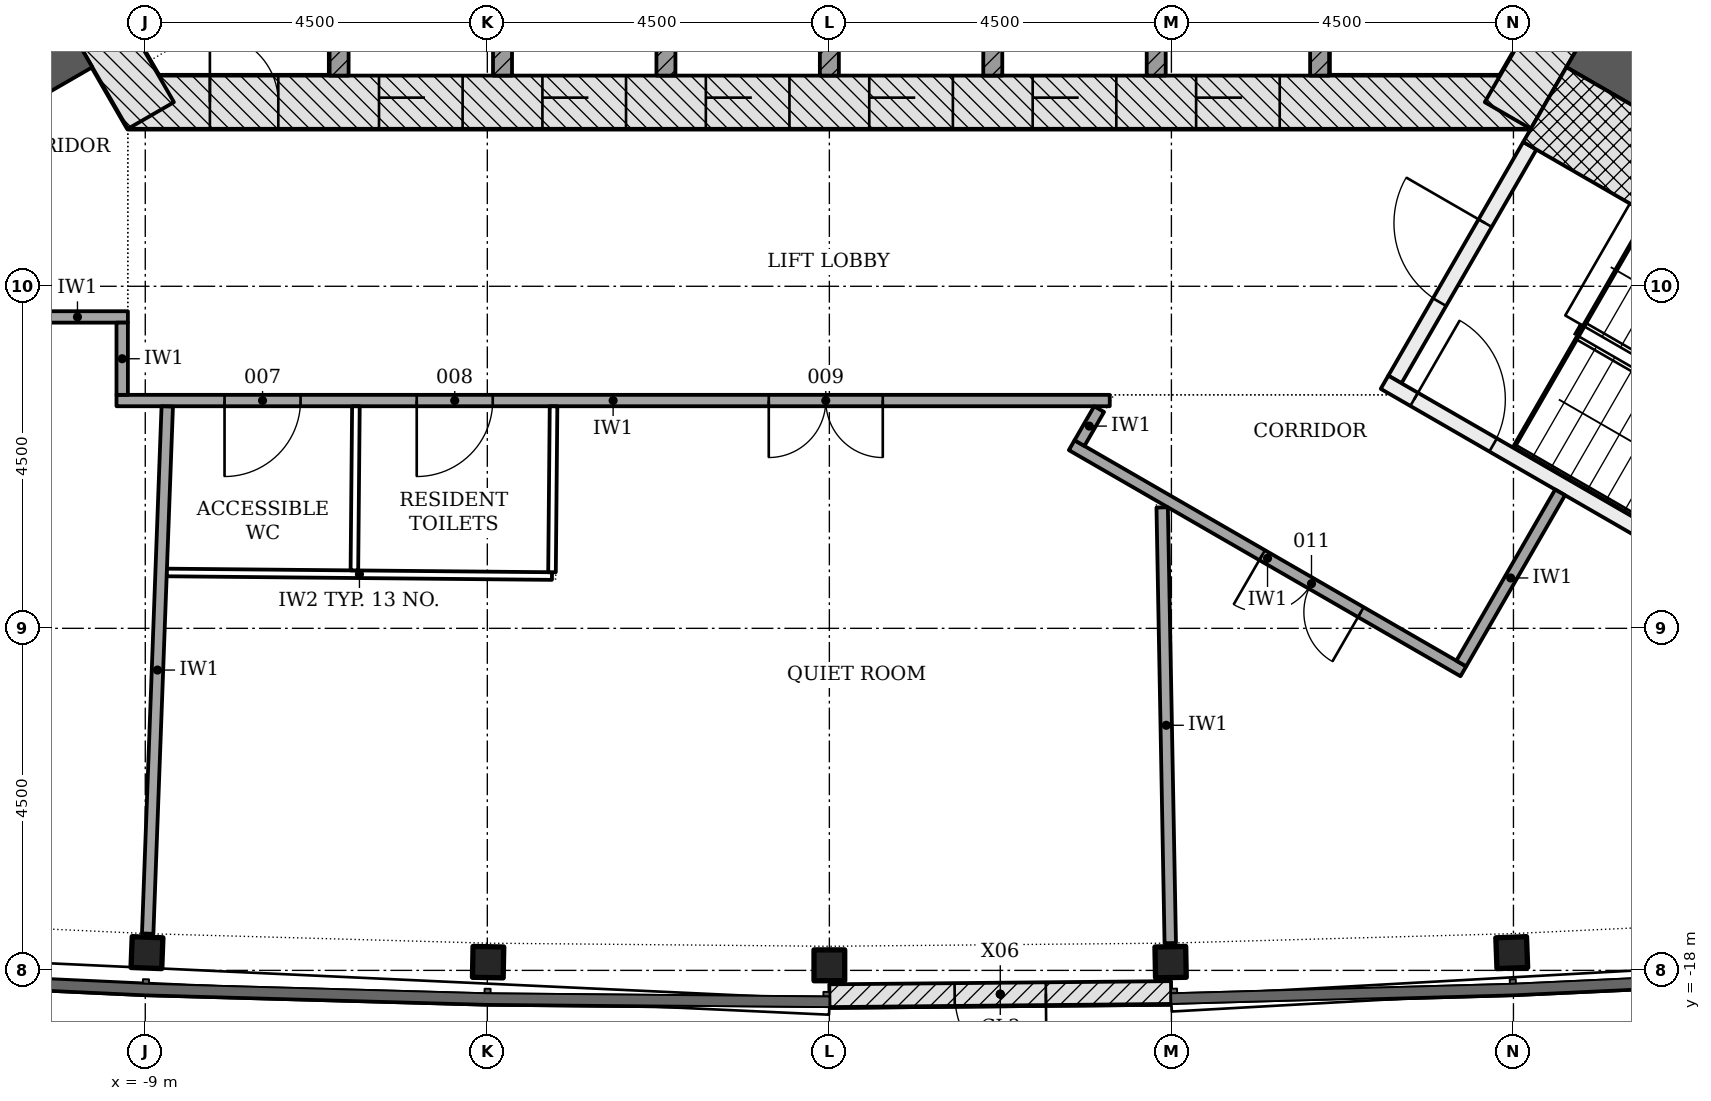
"""IFC4 building model, lengths in metres.
Left out: names, types, materials, properties, quantities, classifications, styles, units other than length and angle.
Written with IfcOpenShell. Run it as: python <this file> out.ifc"""

import sys

from ifc_helpers import new_model, si_unit, direction, frame, frame_2d, origin, origin_2d, place, context, subcontext, project, spatial, rectangle, i_section, extrude, element, fill, save


model = new_model("IFC4")
c1 = context("Model", 3, precision=1e-05, world=origin(), true_north=direction((0.0, 1.0)))
c2 = subcontext(c1, "Body", "Model", "MODEL_VIEW")
j1 = project(units=[si_unit("LENGTHUNIT", "METRE"), si_unit("PLANEANGLEUNIT", "RADIAN")], contexts=[c1])
p1 = place(None, origin())
s1 = spatial("IfcSite", under=j1, at=p1, CompositionType="ELEMENT")
p2 = place(p1, origin())
s2 = spatial("IfcBuilding", under=s1, at=p2, CompositionType="ELEMENT")
p3 = place(p2, frame((0.0, 0.0, 24.0)))
s3 = spatial("IfcBuildingStorey", under=s2, at=p3, CompositionType="ELEMENT", Elevation=24.0)
p4 = place(p3, frame((-9.229, -6.578, -0.2), z_axis=(0.0, 0.0, 1.0), x_axis=(1.0, 0.0, 0.0)))
e1 = element("IfcWall", 1, at=p4, inside=s3, PredefinedType="SHEAR", context=c2, shape_type="SweptSolid", body=[
    extrude(rectangle(XDim=18.458, YDim=0.7, at=frame_2d((9.229, 0.0))), origin(), (0.0, 0.0, 1.0), 3.6),
])
p5 = place(p4, frame((3.304, 0.0, 0.2)))
e2 = element("IfcOpeningElement", 2, at=p5, cuts=e1, PredefinedType="OPENING", context=c2, shape_type="SweptSolid", body=[
    extrude(rectangle(XDim=1.1, YDim=2.1, at=frame_2d((0.55, 1.05))), frame((0.0, 0.36, 0.0), z_axis=(0.0, -1.0, 0.0), x_axis=(1.0, 0.0, 0.0)), (0.0, 0.0, 1.0), 0.72),
])
p6 = place(p4, frame((5.454, 0.0, 0.2)))
e3 = element("IfcOpeningElement", 3, at=p6, cuts=e1, PredefinedType="OPENING", context=c2, shape_type="SweptSolid", body=[
    extrude(rectangle(XDim=1.1, YDim=2.1, at=frame_2d((0.55, 1.05))), frame((0.0, 0.36, 0.0), z_axis=(0.0, -1.0, 0.0), x_axis=(1.0, 0.0, 0.0)), (0.0, 0.0, 1.0), 0.72),
])
p7 = place(p4, frame((7.604, 0.0, 0.2)))
e4 = element("IfcOpeningElement", 4, at=p7, cuts=e1, PredefinedType="OPENING", context=c2, shape_type="SweptSolid", body=[
    extrude(rectangle(XDim=1.1, YDim=2.1, at=frame_2d((0.55, 1.05))), frame((0.0, 0.36, 0.0), z_axis=(0.0, -1.0, 0.0), x_axis=(1.0, 0.0, 0.0)), (0.0, 0.0, 1.0), 0.72),
])
p8 = place(p4, frame((9.754, 0.0, 0.2)))
e5 = element("IfcOpeningElement", 5, at=p8, cuts=e1, PredefinedType="OPENING", context=c2, shape_type="SweptSolid", body=[
    extrude(rectangle(XDim=1.1, YDim=2.1, at=frame_2d((0.55, 1.05))), frame((0.0, 0.36, 0.0), z_axis=(0.0, -1.0, 0.0), x_axis=(1.0, 0.0, 0.0)), (0.0, 0.0, 1.0), 0.72),
])
p9 = place(p4, frame((11.904, 0.0, 0.2)))
e6 = element("IfcOpeningElement", 6, at=p9, cuts=e1, PredefinedType="OPENING", context=c2, shape_type="SweptSolid", body=[
    extrude(rectangle(XDim=1.1, YDim=2.1, at=frame_2d((0.55, 1.05))), frame((0.0, 0.36, 0.0), z_axis=(0.0, -1.0, 0.0), x_axis=(1.0, 0.0, 0.0)), (0.0, 0.0, 1.0), 0.72),
])
p10 = place(p4, frame((14.054, 0.0, 0.2)))
e7 = element("IfcOpeningElement", 7, at=p10, cuts=e1, PredefinedType="OPENING", context=c2, shape_type="SweptSolid", body=[
    extrude(rectangle(XDim=1.1, YDim=2.1, at=frame_2d((0.55, 1.05))), frame((0.0, 0.36, 0.0), z_axis=(0.0, -1.0, 0.0), x_axis=(1.0, 0.0, 0.0)), (0.0, 0.0, 1.0), 0.72),
])
p11 = place(p4, frame((1.079, 0.0, 0.2)))
e8 = element("IfcOpeningElement", 8, at=p11, cuts=e1, PredefinedType="OPENING", context=c2, shape_type="SweptSolid", body=[
    extrude(rectangle(XDim=0.9, YDim=2.1, at=frame_2d((0.45, 1.05))), frame((0.0, 0.36, 0.0), z_axis=(0.0, -1.0, 0.0), x_axis=(1.0, 0.0, 0.0)), (0.0, 0.0, 1.0), 0.72),
])
for number, where, z_axis, x_axis in (
    (9, (8.926, -6.753, -0.2), (0.0, 0.0, 1.0), (0.5, 0.866, 0.0)),
    (10, (-10.311, -4.353, -0.2), (0.0, 0.0, 1.0), (0.5, -0.866, 0.0)),
):
    element("IfcWall", number, at=place(p3, frame(where, z_axis=z_axis, x_axis=x_axis)), inside=s3, PredefinedType="SHEAR", context=c2, shape_type="SweptSolid", body=[
        extrude(rectangle(XDim=2.771, YDim=0.7, at=frame_2d((1.386, 0.0))), origin(), (0.0, 0.0, 1.0), 3.6),
    ])
for number, where, z_axis, x_axis in (
    (11, (-9.922, -5.728, -0.2), (0.0, 0.0, 1.0), (-0.866, -0.5, 0.0)),
    (12, (9.922, -5.728, -0.2), (0.0, 0.0, 1.0), (0.866, -0.5, 0.0)),
):
    element("IfcWall", number, at=place(p3, frame(where, z_axis=z_axis, x_axis=x_axis)), inside=s3, PredefinedType="SHEAR", context=c2, shape_type="SweptSolid", body=[
        extrude(rectangle(XDim=14.633, YDim=0.9, at=frame_2d((7.316, 0.0))), origin(), (0.0, 0.0, 1.0), 3.6),
    ])
for number, where, z_axis, x_axis in (
    (13, (-8.978, -17.767, -0.2), (0.0, 0.0, 1.0), (0.999, -0.037, 0.0)),
    (14, (-4.49, -17.892, -0.2), (0.0, 0.0, 1.0), (1.0, -0.019, 0.0)),
    (15, (0.0, -17.933, -0.2), (0.0, 0.0, 1.0), (1.0, 0.0, 0.0)),
    (16, (4.49, -17.892, -0.2), (0.0, 0.0, 1.0), (1.0, 0.019, 0.0)),
    (17, (8.978, -17.767, -0.2), (0.0, 0.0, 1.0), (0.999, 0.037, 0.0)),
):
    element("IfcColumn", number, at=place(p3, frame(where, z_axis=z_axis, x_axis=x_axis)), inside=s3, PredefinedType="COLUMN", context=c2, shape_type="SweptSolid", body=[
        extrude(i_section(OverallWidth=0.404, OverallDepth=0.406, WebThickness=0.027, FlangeThickness=0.044, FilletRadius=0.015, at=origin_2d()), origin(), (0.0, 0.0, 1.0), 3.6),
    ])
p12 = place(p3, frame((4.496, -18.292, 0.0), z_axis=(0.0, 0.0, 1.0), x_axis=(-0.999956888742, -0.0092855079, 0.0)))
e18 = element("IfcWall", 18, at=p12, inside=s3, PredefinedType="NOTDEFINED", context=c2, shape_type="SweptSolid", body=[
    extrude(rectangle(XDim=4.496, YDim=0.3, at=frame_2d((2.248, 0.0))), origin(), (0.0, 0.0, 1.0), 3.3),
])
p13 = place(p12, frame((1.648, 0.0, 0.0)))
e19 = element("IfcOpeningElement", 19, at=p13, cuts=e18, PredefinedType="OPENING", context=c2, shape_type="SweptSolid", body=[
    extrude(rectangle(XDim=1.2, YDim=2.4, at=frame_2d((0.6, 1.2))), frame((0.0, 0.16, 0.0), z_axis=(0.0, -1.0, 0.0), x_axis=(1.0, 0.0, 0.0)), (0.0, 0.0, 1.0), 0.32),
])
for number, where, z_axis, x_axis in (
    (20, (-6.45, -6.228, -0.2), (0.0, 0.0, 1.0), (0.0, 1.0, 0.0)),
    (21, (-4.3, -6.228, -0.2), (0.0, 0.0, 1.0), (0.0, 1.0, 0.0)),
    (22, (-2.15, -6.228, -0.2), (0.0, 0.0, 1.0), (0.0, 1.0, 0.0)),
    (23, (0.0, -6.228, -0.2), (0.0, 0.0, 1.0), (0.0, 1.0, 0.0)),
    (24, (2.15, -6.228, -0.2), (0.0, 0.0, 1.0), (0.0, 1.0, 0.0)),
    (25, (4.3, -6.228, -0.2), (0.0, 0.0, 1.0), (0.0, 1.0, 0.0)),
    (26, (6.45, -6.228, -0.2), (0.0, 0.0, 1.0), (0.0, 1.0, 0.0)),
):
    element("IfcWall", number, at=place(p3, frame(where, z_axis=z_axis, x_axis=x_axis)), inside=s3, PredefinedType="PARTITIONING", context=c2, shape_type="SweptSolid", body=[
        extrude(rectangle(XDim=2.5, YDim=0.25, at=frame_2d((1.25, 0.0))), origin(), (0.0, 0.0, 1.0), 3.6),
    ])
p14 = place(p3, frame((-10.43, -4.847, -0.2), z_axis=(0.0, 0.0, 1.0), x_axis=(-0.866018442252, -0.500012057535, 0.0)))
e27 = element("IfcWall", 27, at=p14, inside=s3, PredefinedType="SHEAR", context=c2, shape_type="SweptSolid", body=[
    extrude(rectangle(XDim=7.2, YDim=1.136, at=frame_2d((3.6, 0.0))), origin(), (0.0, 0.0, 1.0), 3.6),
])
p15 = place(p3, frame((7.44, -10.226, -0.2), z_axis=(0.0, 0.0, 1.0), x_axis=(0.500022077904, 0.866012656725, 0.0)))
e28 = element("IfcWall", 28, at=p15, inside=s3, PredefinedType="SHEAR", context=c2, shape_type="SweptSolid", body=[
    extrude(rectangle(XDim=3.55, YDim=0.2, at=frame_2d((1.775, 0.0))), origin(), (0.0, 0.0, 1.0), 3.6),
])
p16 = place(p15, frame((1.175, 0.0, 0.2)))
e29 = element("IfcOpeningElement", 29, at=p16, cuts=e28, PredefinedType="OPENING", context=c2, shape_type="SweptSolid", body=[
    extrude(rectangle(XDim=1.2, YDim=2.1, at=frame_2d((0.6, 1.05))), frame((0.0, 0.11, 0.0), z_axis=(0.0, -1.0, 0.0), x_axis=(1.0, 0.0, 0.0)), (0.0, 0.0, 1.0), 0.22),
])
p17 = place(p3, frame((7.304, -10.262, -0.2), z_axis=(0.0, 0.0, 1.0), x_axis=(0.866026594901, -0.49999793692, 0.0)))
e30 = element("IfcWall", 30, at=p17, inside=s3, PredefinedType="SHEAR", context=c2, shape_type="SweptSolid", body=[
    extrude(rectangle(XDim=5.6, YDim=0.2, at=frame_2d((2.8, 0.0))), origin(), (0.0, 0.0, 1.0), 3.6),
])
p18 = place(p17, frame((0.45, 0.0, 0.2)))
e31 = element("IfcOpeningElement", 31, at=p18, cuts=e30, PredefinedType="OPENING", context=c2, shape_type="SweptSolid", body=[
    extrude(rectangle(XDim=1.2, YDim=2.1, at=frame_2d((0.6, 1.05))), frame((0.0, 0.11, 0.0), z_axis=(0.0, -1.0, 0.0), x_axis=(1.0, 0.0, 0.0)), (0.0, 0.0, 1.0), 0.22),
])
p19 = place(p3, frame((9.413, -6.61, -0.2), z_axis=(0.0, 0.0, 1.0), x_axis=(0.866018442252, -0.500012057535, 0.0)))
e32 = element("IfcWall", 32, at=p19, inside=s3, PredefinedType="SHEAR", context=c2, shape_type="SweptSolid", body=[
    extrude(rectangle(XDim=7.2, YDim=1.136, at=frame_2d((3.6, 0.0))), origin(), (0.0, 0.0, 1.0), 3.6),
])
p20 = place(p3, frame((3.689, -10.503, 0.0), z_axis=(0.0, 0.0, 1.0), x_axis=(-1.0, 0.0, 0.0)))
e33 = element("IfcWall", 33, at=p20, inside=s3, PredefinedType="PARTITIONING", context=c2, shape_type="SweptSolid", body=[
    extrude(rectangle(XDim=13.068, YDim=0.15, at=frame_2d((6.534, 0.0))), origin(), (0.0, 0.0, 1.0), 2.768),
])
p21 = place(p20, frame((10.646, 0.0, 0.0)))
e34 = element("IfcOpeningElement", 34, at=p21, cuts=e33, PredefinedType="OPENING", context=c2, shape_type="SweptSolid", body=[
    extrude(rectangle(XDim=1.0, YDim=2.1, at=frame_2d((0.5, 1.05))), frame((0.0, 0.085, 0.0), z_axis=(0.0, -1.0, 0.0), x_axis=(1.0, 0.0, 0.0)), (0.0, 0.0, 1.0), 0.17),
])
p22 = place(p20, frame((8.118, 0.0, 0.0)))
e35 = element("IfcOpeningElement", 35, at=p22, cuts=e33, PredefinedType="OPENING", context=c2, shape_type="SweptSolid", body=[
    extrude(rectangle(XDim=1.0, YDim=2.1, at=frame_2d((0.5, 1.05))), frame((0.0, 0.085, 0.0), z_axis=(0.0, -1.0, 0.0), x_axis=(1.0, 0.0, 0.0)), (0.0, 0.0, 1.0), 0.17),
])
p23 = place(p20, frame((2.986, 0.0, 0.0)))
e36 = element("IfcOpeningElement", 36, at=p23, cuts=e33, PredefinedType="OPENING", context=c2, shape_type="SweptSolid", body=[
    extrude(rectangle(XDim=1.5, YDim=2.1, at=frame_2d((0.75, 1.05))), frame((0.0, 0.085, 0.0), z_axis=(0.0, -1.0, 0.0), x_axis=(1.0, 0.0, 0.0)), (0.0, 0.0, 1.0), 0.17),
])
p24 = place(p3, frame((8.341, -14.066, 0.0), z_axis=(0.0, 0.0, 1.0), x_axis=(-0.866017493347, 0.500013701029, 0.0)))
e37 = element("IfcWall", 37, at=p24, inside=s3, PredefinedType="PARTITIONING", context=c2, shape_type="SweptSolid", body=[
    extrude(rectangle(XDim=5.95, YDim=0.15, at=frame_2d((2.975, 0.0))), origin(), (0.0, 0.0, 1.0), 2.768),
])
p25 = place(p24, frame((1.557, 0.0, 0.0)))
e38 = element("IfcOpeningElement", 38, at=p25, cuts=e37, PredefinedType="OPENING", context=c2, shape_type="SweptSolid", body=[
    extrude(rectangle(XDim=1.5, YDim=2.1, at=frame_2d((0.75, 1.05))), frame((0.0, 0.085, 0.0), z_axis=(0.0, -1.0, 0.0), x_axis=(1.0, 0.0, 0.0)), (0.0, 0.0, 1.0), 0.17),
])
p26 = place(p3, frame((8.314, -13.963, 0.0), z_axis=(0.0, 0.0, 1.0), x_axis=(0.499936506574, 0.866062058628, 0.0)))
e39 = element("IfcWall", 39, at=p26, inside=s3, PredefinedType="PARTITIONING", context=c2, shape_type="SweptSolid", body=[
    extrude(rectangle(XDim=2.6, YDim=0.15, at=frame_2d((1.3, 0.0))), origin(), (0.0, 0.0, 1.0), 2.923),
])
p27 = place(p3, frame((-10.555, -9.403, 0.0), z_axis=(0.0, 0.0, 1.0), x_axis=(1.0, 0.0, 0.0)))
e40 = element("IfcWall", 40, at=p27, inside=s3, PredefinedType="PARTITIONING", context=c2, shape_type="SweptSolid", body=[
    extrude(rectangle(XDim=1.326, YDim=0.15, at=frame_2d((0.663, 0.0))), origin(), (0.0, 0.0, 1.0), 3.4),
])
p28 = place(p3, frame((-9.304, -10.428, 0.0), z_axis=(0.0, 0.0, 1.0), x_axis=(0.0, 1.0, 0.0)))
e41 = element("IfcWall", 41, at=p28, inside=s3, PredefinedType="PARTITIONING", context=c2, shape_type="SweptSolid", body=[
    extrude(rectangle(XDim=0.95, YDim=0.15, at=frame_2d((0.475, 0.0))), origin(), (0.0, 0.0, 1.0), 3.4),
])
p29 = place(p3, frame((3.291, -11.063, 0.0), z_axis=(0.0, 0.0, 1.0), x_axis=(0.499899694197, 0.866083307622, 0.0)))
e42 = element("IfcWall", 42, at=p29, inside=s3, PredefinedType="PARTITIONING", context=c2, shape_type="SweptSolid", body=[
    extrude(rectangle(XDim=0.517, YDim=0.15, at=frame_2d((0.258, 0.0))), origin(), (0.0, 0.0, 1.0), 3.4),
])
p30 = place(p3, frame((-8.968, -17.517, 0.0), z_axis=(0.0, 0.0, 1.0), x_axis=(0.037111842783, 0.999311118284, 0.0)))
e43 = element("IfcWall", 43, at=p30, inside=s3, PredefinedType="PARTITIONING", context=c2, shape_type="SweptSolid", body=[
    extrude(rectangle(XDim=6.94, YDim=0.15, at=frame_2d((3.47, 0.0))), origin(), (0.0, 0.0, 1.0), 2.768),
])
p31 = place(p3, frame((4.485, -17.642, 0.0), z_axis=(0.0, 0.0, 1.0), x_axis=(-0.018565794352, 0.999827640786, 0.0)))
e44 = element("IfcWall", 44, at=p31, inside=s3, PredefinedType="PARTITIONING", context=c2, shape_type="SweptSolid", body=[
    extrude(rectangle(XDim=5.733, YDim=0.15, at=frame_2d((2.867, 0.0))), origin(), (0.0, 0.0, 1.0), 2.768),
])
p32 = place(p3, frame((-8.715, -12.765, 0.0), z_axis=(0.0, 0.0, 1.0), x_axis=(0.999957193633, -0.00925261596, 0.0)))
e45 = element("IfcWall", 45, at=p32, inside=s3, PredefinedType="PARTITIONING", context=c2, shape_type="SweptSolid", body=[
    extrude(rectangle(XDim=5.066, YDim=0.1, at=frame_2d((2.533, 0.0))), origin(), (0.0, 0.0, 1.0), 2.768),
])
p33 = place(p3, frame((-3.649, -12.762, 0.0), z_axis=(0.0, 0.0, 1.0), x_axis=(0.009279564663, 0.999956943913, 0.0)))
e46 = element("IfcWall", 46, at=p33, inside=s3, PredefinedType="PARTITIONING", context=c2, shape_type="SweptSolid", body=[
    extrude(rectangle(XDim=2.184, YDim=0.1, at=frame_2d((1.092, 0.0))), origin(), (0.0, 0.0, 1.0), 3.4),
])
p34 = place(p3, frame((-6.249, -12.738, 0.0), z_axis=(0.0, 0.0, 1.0), x_axis=(0.009270376076, 0.99995702914, 0.0)))
e47 = element("IfcWall", 47, at=p34, inside=s3, PredefinedType="PARTITIONING", context=c2, shape_type="SweptSolid", body=[
    extrude(rectangle(XDim=2.159, YDim=0.1, at=frame_2d((1.08, 0.0))), origin(), (0.0, 0.0, 1.0), 3.4),
])
p35 = place(p13, origin())
e48 = element("IfcDoor", 48, at=p35, inside=s3, OperationType="SINGLE_SWING_LEFT", PredefinedType="DOOR", context=c2, shape_type="SweptSolid", body=[
    extrude(rectangle(XDim=1.2, YDim=2.4, at=frame_2d((0.6, 1.2))), frame((0.0, 0.025, 0.0), z_axis=(0.0, -1.0, 0.0), x_axis=(1.0, 0.0, 0.0)), (0.0, 0.0, 1.0), 0.05),
])
fill(e19, e48)
p36 = place(p5, origin())
e49 = element("IfcDoor", 49, at=p36, inside=s3, OperationType="DOUBLE_DOOR_SLIDING", PredefinedType="DOOR", context=c2, shape_type="SweptSolid", body=[
    extrude(rectangle(XDim=1.1, YDim=2.1, at=frame_2d((0.55, 1.05))), frame((0.0, 0.025, 0.0), z_axis=(0.0, -1.0, 0.0), x_axis=(1.0, 0.0, 0.0)), (0.0, 0.0, 1.0), 0.05),
])
fill(e2, e49)
p37 = place(p6, origin())
e50 = element("IfcDoor", 50, at=p37, inside=s3, OperationType="DOUBLE_DOOR_SLIDING", PredefinedType="DOOR", context=c2, shape_type="SweptSolid", body=[
    extrude(rectangle(XDim=1.1, YDim=2.1, at=frame_2d((0.55, 1.05))), frame((0.0, 0.025, 0.0), z_axis=(0.0, -1.0, 0.0), x_axis=(1.0, 0.0, 0.0)), (0.0, 0.0, 1.0), 0.05),
])
fill(e3, e50)
p38 = place(p7, origin())
e51 = element("IfcDoor", 51, at=p38, inside=s3, OperationType="DOUBLE_DOOR_SLIDING", PredefinedType="DOOR", context=c2, shape_type="SweptSolid", body=[
    extrude(rectangle(XDim=1.1, YDim=2.1, at=frame_2d((0.55, 1.05))), frame((0.0, 0.025, 0.0), z_axis=(0.0, -1.0, 0.0), x_axis=(1.0, 0.0, 0.0)), (0.0, 0.0, 1.0), 0.05),
])
fill(e4, e51)
p39 = place(p8, origin())
e52 = element("IfcDoor", 52, at=p39, inside=s3, OperationType="DOUBLE_DOOR_SLIDING", PredefinedType="DOOR", context=c2, shape_type="SweptSolid", body=[
    extrude(rectangle(XDim=1.1, YDim=2.1, at=frame_2d((0.55, 1.05))), frame((0.0, 0.025, 0.0), z_axis=(0.0, -1.0, 0.0), x_axis=(1.0, 0.0, 0.0)), (0.0, 0.0, 1.0), 0.05),
])
fill(e5, e52)
p40 = place(p9, origin())
e53 = element("IfcDoor", 53, at=p40, inside=s3, OperationType="DOUBLE_DOOR_SLIDING", PredefinedType="DOOR", context=c2, shape_type="SweptSolid", body=[
    extrude(rectangle(XDim=1.1, YDim=2.1, at=frame_2d((0.55, 1.05))), frame((0.0, 0.025, 0.0), z_axis=(0.0, -1.0, 0.0), x_axis=(1.0, 0.0, 0.0)), (0.0, 0.0, 1.0), 0.05),
])
fill(e6, e53)
p41 = place(p10, origin())
e54 = element("IfcDoor", 54, at=p41, inside=s3, OperationType="DOUBLE_DOOR_SLIDING", PredefinedType="DOOR", context=c2, shape_type="SweptSolid", body=[
    extrude(rectangle(XDim=1.1, YDim=2.1, at=frame_2d((0.55, 1.05))), frame((0.0, 0.025, 0.0), z_axis=(0.0, -1.0, 0.0), x_axis=(1.0, 0.0, 0.0)), (0.0, 0.0, 1.0), 0.05),
])
fill(e7, e54)
p42 = place(p11, origin())
e55 = element("IfcDoor", 55, at=p42, inside=s3, OperationType="SINGLE_SWING_LEFT", PredefinedType="DOOR", context=c2, shape_type="SweptSolid", body=[
    extrude(rectangle(XDim=0.9, YDim=2.1, at=frame_2d((0.45, 1.05))), frame((0.0, 0.075, 0.0), z_axis=(0.0, -1.0, 0.0), x_axis=(1.0, 0.0, 0.0)), (0.0, 0.0, 1.0), 0.15),
])
fill(e8, e55)
p43 = place(p16, origin())
e56 = element("IfcDoor", 56, at=p43, inside=s3, OperationType="SINGLE_SWING_RIGHT", PredefinedType="DOOR", context=c2, shape_type="SweptSolid", body=[
    extrude(rectangle(XDim=1.2, YDim=2.1, at=frame_2d((0.6, 1.05))), frame((0.0, 0.025, 0.0), z_axis=(0.0, -1.0, 0.0), x_axis=(1.0, 0.0, 0.0)), (0.0, 0.0, 1.0), 0.05),
])
fill(e29, e56)
p44 = place(p18, origin())
e57 = element("IfcDoor", 57, at=p44, inside=s3, OperationType="SINGLE_SWING_LEFT", PredefinedType="DOOR", context=c2, shape_type="SweptSolid", body=[
    extrude(rectangle(XDim=1.2, YDim=2.1, at=frame_2d((0.6, 1.05))), frame((0.0, 0.025, 0.0), z_axis=(0.0, -1.0, 0.0), x_axis=(1.0, 0.0, 0.0)), (0.0, 0.0, 1.0), 0.05),
])
fill(e31, e57)
p45 = place(p21, origin())
e58 = element("IfcDoor", 58, at=p45, inside=s3, OperationType="SINGLE_SWING_RIGHT", PredefinedType="DOOR", context=c2, shape_type="SweptSolid", body=[
    extrude(rectangle(XDim=1.0, YDim=2.1, at=frame_2d((0.5, 1.05))), frame((0.0, 0.025, 0.0), z_axis=(0.0, -1.0, 0.0), x_axis=(1.0, 0.0, 0.0)), (0.0, 0.0, 1.0), 0.05),
])
fill(e34, e58)
p46 = place(p22, origin())
e59 = element("IfcDoor", 59, at=p46, inside=s3, OperationType="SINGLE_SWING_RIGHT", PredefinedType="DOOR", context=c2, shape_type="SweptSolid", body=[
    extrude(rectangle(XDim=1.0, YDim=2.1, at=frame_2d((0.5, 1.05))), frame((0.0, 0.025, 0.0), z_axis=(0.0, -1.0, 0.0), x_axis=(1.0, 0.0, 0.0)), (0.0, 0.0, 1.0), 0.05),
])
fill(e35, e59)
p47 = place(p23, origin())
e60 = element("IfcDoor", 60, at=p47, inside=s3, OperationType="DOUBLE_DOOR_SINGLE_SWING", PredefinedType="DOOR", context=c2, shape_type="SweptSolid", body=[
    extrude(rectangle(XDim=1.5, YDim=2.1, at=frame_2d((0.75, 1.05))), frame((0.0, 0.025, 0.0), z_axis=(0.0, -1.0, 0.0), x_axis=(1.0, 0.0, 0.0)), (0.0, 0.0, 1.0), 0.05),
])
fill(e36, e60)
p48 = place(p25, origin())
e61 = element("IfcDoor", 61, at=p48, inside=s3, OperationType="DOUBLE_DOOR_SINGLE_SWING", PredefinedType="DOOR", context=c2, shape_type="SweptSolid", body=[
    extrude(rectangle(XDim=1.5, YDim=2.1, at=frame_2d((0.75, 1.05))), frame((0.0, 0.025, 0.0), z_axis=(0.0, -1.0, 0.0), x_axis=(1.0, 0.0, 0.0)), (0.0, 0.0, 1.0), 0.05),
])
fill(e38, e61)
save(model, sys.argv[1])
